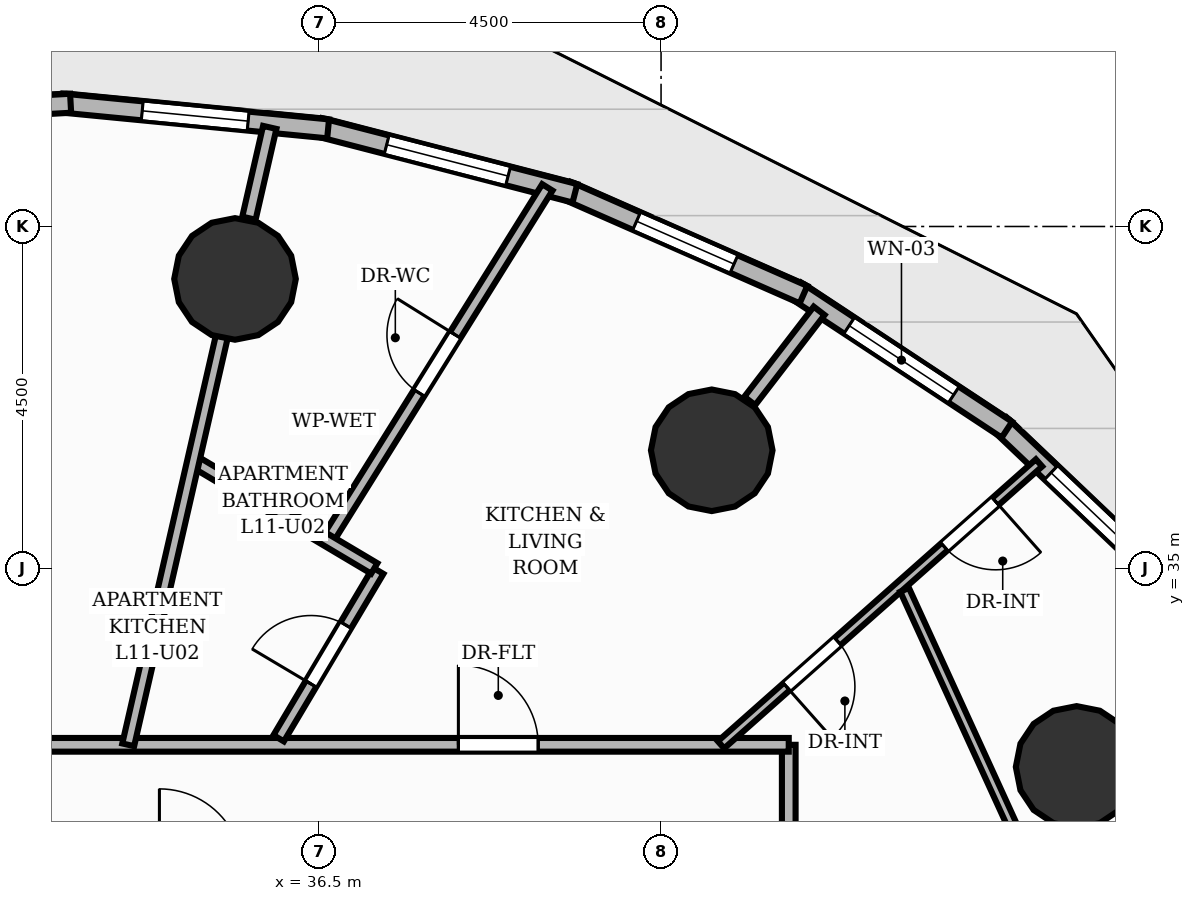
"""IFC4 building model, lengths in metres.
Left out: names, types, materials, properties, quantities, classifications, styles, units other than length and angle.
Written with IfcOpenShell. Run it as: python <this file> out.ifc"""

import sys

from ifc_helpers import new_model, si_unit, direction, frame, frame_2d, origin, origin_2d, place, context, subcontext, project, spatial, rectangle, circle, extrude, element, fill, save


model = new_model("IFC4")
c1 = context("Model", 3, precision=1e-05, world=origin(), true_north=direction((0.0, 1.0)))
c2 = subcontext(c1, "Body", "Model", "MODEL_VIEW")
j1 = project(units=[si_unit("LENGTHUNIT", "METRE"), si_unit("PLANEANGLEUNIT", "RADIAN")], contexts=[c1])
p1 = place(None, origin())
s1 = spatial("IfcSite", under=j1, at=p1, CompositionType="ELEMENT")
p2 = place(p1, origin())
s2 = spatial("IfcBuilding", under=s1, at=p2, CompositionType="ELEMENT")
p3 = place(p2, frame((0.0, 0.0, 40.8)))
s3 = spatial("IfcBuildingStorey", under=s2, at=p3, CompositionType="ELEMENT", Elevation=40.8)
for number, where, z_axis, x_axis in (
    (1, (46.468, 32.389, 0.0), (0.0, 0.0, 1.0), (1.0, 0.0, 0.0)),
    (2, (41.667, 36.555, 0.0), (0.0, 0.0, 1.0), (1.0, 0.0, 0.0)),
    (3, (35.395, 38.81, 0.0), (0.0, 0.0, 1.0), (1.0, 0.0, 0.0)),
):
    element("IfcColumn", number, at=place(p3, frame(where, z_axis=z_axis, x_axis=x_axis)), inside=s3, PredefinedType="COLUMN", context=c2, shape_type="SweptSolid", body=[
        extrude(circle(Radius=0.8, at=origin_2d()), origin(), (0.0, 0.0, 1.0), 3.2),
    ])
p4 = place(p3, frame((45.462, 36.896, 0.0), z_axis=(0.0, 0.0, 1.0), x_axis=(0.724569059836, -0.689202203659, 0.0)))
e4 = element("IfcWall", 4, at=p4, inside=s3, PredefinedType="SOLIDWALL", context=c2, shape_type="SweptSolid", body=[
    extrude(rectangle(XDim=3.244, YDim=0.25, at=frame_2d((1.622, 0.0))), origin(), (0.0, 0.0, 1.0), 2.96),
])
p5 = place(p4, frame((0.922, 0.0, 0.85)))
e5 = element("IfcOpeningElement", 5, at=p5, cuts=e4, PredefinedType="OPENING", context=c2, shape_type="SweptSolid", body=[
    extrude(rectangle(XDim=1.4, YDim=1.55, at=frame_2d((0.7, 0.775))), frame((0.0, 0.135, 0.0), z_axis=(0.0, -1.0, 0.0), x_axis=(1.0, 0.0, 0.0)), (0.0, 0.0, 1.0), 0.27),
])
p6 = place(p3, frame((42.777, 38.656, 0.0), z_axis=(0.0, 0.0, 1.0), x_axis=(0.834663448541, -0.550760317805, 0.0)))
e6 = element("IfcWall", 6, at=p6, inside=s3, PredefinedType="SOLIDWALL", context=c2, shape_type="SweptSolid", body=[
    extrude(rectangle(XDim=3.323, YDim=0.25, at=frame_2d((1.661, 0.0))), origin(), (0.0, 0.0, 1.0), 2.96),
])
p7 = place(p6, frame((0.836, 0.0, 0.85)))
e7 = element("IfcOpeningElement", 7, at=p7, cuts=e6, PredefinedType="OPENING", context=c2, shape_type="SweptSolid", body=[
    extrude(rectangle(XDim=1.65, YDim=1.55, at=frame_2d((0.825, 0.775))), frame((0.0, 0.135, 0.0), z_axis=(0.0, -1.0, 0.0), x_axis=(1.0, 0.0, 0.0)), (0.0, 0.0, 1.0), 0.27),
])
p8 = place(p3, frame((39.763, 39.972, 0.0), z_axis=(0.0, 0.0, 1.0), x_axis=(0.915312914138, -0.402743428515, 0.0)))
e8 = element("IfcWall", 8, at=p8, inside=s3, PredefinedType="SOLIDWALL", context=c2, shape_type="SweptSolid", body=[
    extrude(rectangle(XDim=3.399, YDim=0.25, at=frame_2d((1.699, 0.0))), origin(), (0.0, 0.0, 1.0), 2.96),
])
p9 = place(p8, frame((1.0, 0.0, 0.85)))
e9 = element("IfcOpeningElement", 9, at=p9, cuts=e8, PredefinedType="OPENING", context=c2, shape_type="SweptSolid", body=[
    extrude(rectangle(XDim=1.4, YDim=1.55, at=frame_2d((0.7, 0.775))), frame((0.0, 0.135, 0.0), z_axis=(0.0, -1.0, 0.0), x_axis=(1.0, 0.0, 0.0)), (0.0, 0.0, 1.0), 0.27),
])
p10 = place(p3, frame((36.512, 40.803, 0.0), z_axis=(0.0, 0.0, 1.0), x_axis=(0.968176058434, -0.250270093848, 0.0)))
e10 = element("IfcWall", 10, at=p10, inside=s3, PredefinedType="SOLIDWALL", context=c2, shape_type="SweptSolid", body=[
    extrude(rectangle(XDim=3.465, YDim=0.25, at=frame_2d((1.732, 0.0))), origin(), (0.0, 0.0, 1.0), 2.96),
])
p11 = place(p10, frame((0.907, 0.0, 0.85)))
e11 = element("IfcOpeningElement", 11, at=p11, cuts=e10, PredefinedType="OPENING", context=c2, shape_type="SweptSolid", body=[
    extrude(rectangle(XDim=1.65, YDim=1.55, at=frame_2d((0.825, 0.775))), frame((0.0, 0.135, 0.0), z_axis=(0.0, -1.0, 0.0), x_axis=(1.0, 0.0, 0.0)), (0.0, 0.0, 1.0), 0.27),
])
p12 = place(p3, frame((33.123, 41.124, 0.0), z_axis=(0.0, 0.0, 1.0), x_axis=(0.995323323337, -0.096599596386, 0.0)))
e12 = element("IfcWall", 12, at=p12, inside=s3, PredefinedType="SOLIDWALL", context=c2, shape_type="SweptSolid", body=[
    extrude(rectangle(XDim=3.513, YDim=0.25, at=frame_2d((1.756, 0.0))), origin(), (0.0, 0.0, 1.0), 2.96),
])
p13 = place(p12, frame((1.056, 0.0, 0.85)))
e13 = element("IfcOpeningElement", 13, at=p13, cuts=e12, PredefinedType="OPENING", context=c2, shape_type="SweptSolid", body=[
    extrude(rectangle(XDim=1.4, YDim=1.29, at=frame_2d((0.7, 0.645))), frame((0.0, 0.135, 0.0), z_axis=(0.0, -1.0, 0.0), x_axis=(1.0, 0.0, 0.0)), (0.0, 0.0, 1.0), 0.27),
])
p14 = place(p3, frame((29.699, 40.923, 0.0), z_axis=(0.0, 0.0, 1.0), x_axis=(0.998425121055, 0.056100602904, 0.0)))
e14 = element("IfcWall", 14, at=p14, inside=s3, PredefinedType="SOLIDWALL", context=c2, shape_type="SweptSolid", body=[
    extrude(rectangle(XDim=3.538, YDim=0.25, at=frame_2d((1.769, 0.0))), origin(), (0.0, 0.0, 1.0), 2.96),
])
p15 = place(p14, frame((1.194, 0.0, 0.0)))
e15 = element("IfcOpeningElement", 15, at=p15, cuts=e14, PredefinedType="OPENING", context=c2, shape_type="SweptSolid", body=[
    extrude(rectangle(XDim=1.15, YDim=2.2, at=frame_2d((0.575, 1.1))), frame((0.0, 0.135, 0.0), z_axis=(0.0, -1.0, 0.0), x_axis=(1.0, 0.0, 0.0)), (0.0, 0.0, 1.0), 0.27),
])
p16 = place(p3, frame((42.167, 37.205, 0.0), z_axis=(0.0, 0.0, 1.0), x_axis=(0.609978856004, 0.792417689876, 0.0)))
e16 = element("IfcWall", 16, at=p16, inside=s3, PredefinedType="PARTITIONING", context=c2, shape_type="SweptSolid", body=[
    extrude(rectangle(XDim=1.496, YDim=0.18, at=frame_2d((0.748, 0.0))), origin(), (0.0, 0.0, 1.0), 2.178),
])
p17 = place(p3, frame((35.578, 39.609, 0.0), z_axis=(0.0, 0.0, 1.0), x_axis=(0.223317008343, 0.974745871386, 0.0)))
e17 = element("IfcWall", 17, at=p17, inside=s3, PredefinedType="PARTITIONING", context=c2, shape_type="SweptSolid", body=[
    extrude(rectangle(XDim=1.226, YDim=0.18, at=frame_2d((0.613, 0.0))), origin(), (0.0, 0.0, 1.0), 2.178),
])
p18 = place(p3, frame((42.68, 32.68, 0.0), z_axis=(0.0, 0.0, 1.0), x_axis=(0.0, -1.0, 0.0)))
e18 = element("IfcWall", 18, at=p18, inside=s3, PredefinedType="PARTITIONING", context=c2, shape_type="SweptSolid", body=[
    extrude(rectangle(XDim=10.065, YDim=0.18, at=frame_2d((5.032, 0.0))), origin(), (0.0, 0.0, 1.0), 2.955),
])
p19 = place(p18, frame((7.374, 0.0, 0.0)))
e19 = element("IfcOpeningElement", 19, at=p19, cuts=e18, PredefinedType="OPENING", context=c2, shape_type="SweptSolid", body=[
    extrude(rectangle(XDim=0.9, YDim=2.1, at=frame_2d((0.45, 1.05))), frame((0.0, 0.1, 0.0), z_axis=(0.0, -1.0, 0.0), x_axis=(1.0, 0.0, 0.0)), (0.0, 0.0, 1.0), 0.2),
])
p20 = place(p3, frame((21.32, 32.68, 0.0), z_axis=(0.0, 0.0, 1.0), x_axis=(1.0, 0.0, 0.0)))
e20 = element("IfcWall", 20, at=p20, inside=s3, PredefinedType="PARTITIONING", context=c2, shape_type="SweptSolid", body=[
    extrude(rectangle(XDim=21.36, YDim=0.18, at=frame_2d((10.68, 0.0))), origin(), (0.0, 0.0, 1.0), 2.955),
])
p21 = place(p20, frame((17.013, 0.0, 0.0)))
e21 = element("IfcOpeningElement", 21, at=p21, cuts=e20, PredefinedType="OPENING", context=c2, shape_type="SweptSolid", body=[
    extrude(rectangle(XDim=1.05, YDim=2.15, at=frame_2d((0.525, 1.075))), frame((0.0, 0.1, 0.0), z_axis=(0.0, -1.0, 0.0), x_axis=(1.0, 0.0, 0.0)), (0.0, 0.0, 1.0), 0.2),
])
p22 = place(p20, frame((5.82, 0.0, 0.0)))
e22 = element("IfcOpeningElement", 22, at=p22, cuts=e20, PredefinedType="OPENING", context=c2, shape_type="SweptSolid", body=[
    extrude(rectangle(XDim=1.05, YDim=2.15, at=frame_2d((0.525, 1.075))), frame((0.0, 0.1, 0.0), z_axis=(0.0, -1.0, 0.0), x_axis=(1.0, 0.0, 0.0)), (0.0, 0.0, 1.0), 0.2),
])
p23 = place(p3, frame((36.607, 35.369, 0.0), z_axis=(0.0, 0.0, 1.0), x_axis=(0.529180994646, 0.848508971612, 0.0)))
e23 = element("IfcWall", 23, at=p23, inside=s3, PredefinedType="PLUMBINGWALL", context=c2, shape_type="SweptSolid", body=[
    extrude(rectangle(XDim=5.475, YDim=0.16, at=frame_2d((2.737, 0.0))), origin(), (0.0, 0.0, 1.0), 2.641),
])
p24 = place(p23, frame((2.288, 0.0, 0.0)))
e24 = element("IfcOpeningElement", 24, at=p24, cuts=e23, PredefinedType="OPENING", context=c2, shape_type="SweptSolid", body=[
    extrude(rectangle(XDim=0.9, YDim=2.1, at=frame_2d((0.45, 1.05))), frame((0.0, 0.09, 0.0), z_axis=(0.0, -1.0, 0.0), x_axis=(1.0, 0.0, 0.0)), (0.0, 0.0, 1.0), 0.18),
])
p25 = place(p3, frame((45.973, 36.39, 0.0), z_axis=(0.0, 0.0, 1.0), x_axis=(-0.748208515509, -0.663463651845, 0.0)))
e25 = element("IfcWall", 25, at=p25, inside=s3, PredefinedType="PARTITIONING", context=c2, shape_type="SweptSolid", body=[
    extrude(rectangle(XDim=5.592, YDim=0.125, at=frame_2d((2.796, 0.0))), origin(), (0.0, 0.0, 1.0), 2.955),
])
p26 = place(p25, frame((0.765, 0.0, 0.0)))
e26 = element("IfcOpeningElement", 26, at=p26, cuts=e25, PredefinedType="OPENING", context=c2, shape_type="SweptSolid", body=[
    extrude(rectangle(XDim=0.9, YDim=2.1, at=frame_2d((0.45, 1.05))), frame((0.0, 0.073, 0.0), z_axis=(0.0, -1.0, 0.0), x_axis=(1.0, 0.0, 0.0)), (0.0, 0.0, 1.0), 0.145),
])
p27 = place(p25, frame((3.54, 0.0, 0.0)))
e27 = element("IfcOpeningElement", 27, at=p27, cuts=e25, PredefinedType="OPENING", context=c2, shape_type="SweptSolid", body=[
    extrude(rectangle(XDim=0.9, YDim=2.1, at=frame_2d((0.45, 1.05))), frame((0.0, 0.073, 0.0), z_axis=(0.0, -1.0, 0.0), x_axis=(1.0, 0.0, 0.0)), (0.0, 0.0, 1.0), 0.145),
])
p28 = place(p3, frame((35.969, 32.766, 0.0), z_axis=(0.0, 0.0, 1.0), x_axis=(0.51079395194, 0.859703168926, 0.0)))
e28 = element("IfcWall", 28, at=p28, inside=s3, PredefinedType="PLUMBINGWALL", context=c2, shape_type="SweptSolid", body=[
    extrude(rectangle(XDim=2.564, YDim=0.16, at=frame_2d((1.282, 0.0))), origin(), (0.0, 0.0, 1.0), 2.955),
])
p29 = place(p28, frame((0.832, 0.0, 0.0)))
e29 = element("IfcOpeningElement", 29, at=p29, cuts=e28, PredefinedType="OPENING", context=c2, shape_type="SweptSolid", body=[
    extrude(rectangle(XDim=0.9, YDim=2.1, at=frame_2d((0.45, 1.05))), frame((0.0, 0.09, 0.0), z_axis=(0.0, -1.0, 0.0), x_axis=(1.0, 0.0, 0.0)), (0.0, 0.0, 1.0), 0.18),
])
p30 = place(p3, frame((37.227, 35.001, 0.0), z_axis=(0.0, 0.0, 1.0), x_axis=(-0.859670870998, 0.510848307776, 0.0)))
e30 = element("IfcWall", 30, at=p30, inside=s3, PredefinedType="PLUMBINGWALL", context=c2, shape_type="SweptSolid", body=[
    extrude(rectangle(XDim=2.77, YDim=0.16, at=frame_2d((1.385, 0.0))), origin(), (0.0, 0.0, 1.0), 2.955),
])
p31 = place(p3, frame((33.99, 32.68, 0.0), z_axis=(0.0, 0.0, 1.0), x_axis=(0.223435779217, 0.974718653031, 0.0)))
e31 = element("IfcWall", 31, at=p31, inside=s3, PredefinedType="PLUMBINGWALL", context=c2, shape_type="SweptSolid", body=[
    extrude(rectangle(XDim=5.511, YDim=0.16, at=frame_2d((2.756, 0.0))), origin(), (0.0, 0.0, 1.0), 2.178),
])
p32 = place(p3, frame((47.81, 26.827, 0.0), z_axis=(0.0, 0.0, 1.0), x_axis=(-0.41559351113, 0.909550456823, 0.0)))
e32 = element("IfcWall", 32, at=p32, inside=s3, PredefinedType="PARTITIONING", context=c2, shape_type="SweptSolid", body=[
    extrude(rectangle(XDim=8.677, YDim=0.125, at=frame_2d((4.338, 0.0))), origin(), (0.0, 0.0, 1.0), 2.328),
])
p33 = place(p5, origin())
e33 = element("IfcWindow", 33, at=p33, inside=s3, PartitioningType="SINGLE_PANEL", PredefinedType="WINDOW", context=c2, shape_type="SweptSolid", body=[
    extrude(rectangle(XDim=1.4, YDim=1.55, at=frame_2d((0.7, 0.775))), frame((0.0, 0.03, 0.0), z_axis=(0.0, -1.0, 0.0), x_axis=(1.0, 0.0, 0.0)), (0.0, 0.0, 1.0), 0.06),
])
fill(e5, e33)
p34 = place(p7, origin())
e34 = element("IfcWindow", 34, at=p34, inside=s3, PartitioningType="SINGLE_PANEL", PredefinedType="WINDOW", context=c2, shape_type="SweptSolid", body=[
    extrude(rectangle(XDim=1.65, YDim=1.55, at=frame_2d((0.825, 0.775))), frame((0.0, 0.03, 0.0), z_axis=(0.0, -1.0, 0.0), x_axis=(1.0, 0.0, 0.0)), (0.0, 0.0, 1.0), 0.06),
])
fill(e7, e34)
p35 = place(p9, origin())
e35 = element("IfcWindow", 35, at=p35, inside=s3, PartitioningType="SINGLE_PANEL", PredefinedType="WINDOW", context=c2, shape_type="SweptSolid", body=[
    extrude(rectangle(XDim=1.4, YDim=1.55, at=frame_2d((0.7, 0.775))), frame((0.0, 0.03, 0.0), z_axis=(0.0, -1.0, 0.0), x_axis=(1.0, 0.0, 0.0)), (0.0, 0.0, 1.0), 0.06),
])
fill(e9, e35)
p36 = place(p11, origin())
e36 = element("IfcWindow", 36, at=p36, inside=s3, PartitioningType="SINGLE_PANEL", PredefinedType="WINDOW", context=c2, shape_type="SweptSolid", body=[
    extrude(rectangle(XDim=1.65, YDim=1.55, at=frame_2d((0.825, 0.775))), frame((0.0, 0.03, 0.0), z_axis=(0.0, -1.0, 0.0), x_axis=(1.0, 0.0, 0.0)), (0.0, 0.0, 1.0), 0.06),
])
fill(e11, e36)
p37 = place(p13, origin())
e37 = element("IfcWindow", 37, at=p37, inside=s3, PartitioningType="SINGLE_PANEL", PredefinedType="WINDOW", context=c2, shape_type="SweptSolid", body=[
    extrude(rectangle(XDim=1.4, YDim=1.29, at=frame_2d((0.7, 0.645))), frame((0.0, 0.03, 0.0), z_axis=(0.0, -1.0, 0.0), x_axis=(1.0, 0.0, 0.0)), (0.0, 0.0, 1.0), 0.06),
])
fill(e13, e37)
p38 = place(p21, origin())
e38 = element("IfcDoor", 38, at=p38, inside=s3, OperationType="SINGLE_SWING_LEFT", PredefinedType="DOOR", context=c2, shape_type="SweptSolid", body=[
    extrude(rectangle(XDim=1.05, YDim=2.15, at=frame_2d((0.525, 1.075))), frame((0.0, 0.025, 0.0), z_axis=(0.0, -1.0, 0.0), x_axis=(1.0, 0.0, 0.0)), (0.0, 0.0, 1.0), 0.05),
])
fill(e21, e38)
p39 = place(p24, origin())
e39 = element("IfcDoor", 39, at=p39, inside=s3, OperationType="SINGLE_SWING_RIGHT", PredefinedType="DOOR", context=c2, shape_type="SweptSolid", body=[
    extrude(rectangle(XDim=0.9, YDim=2.1, at=frame_2d((0.45, 1.05))), frame((0.0, 0.025, 0.0), z_axis=(0.0, -1.0, 0.0), x_axis=(1.0, 0.0, 0.0)), (0.0, 0.0, 1.0), 0.05),
])
fill(e24, e39)
p40 = place(p26, origin())
e40 = element("IfcDoor", 40, at=p40, inside=s3, OperationType="SINGLE_SWING_LEFT", PredefinedType="DOOR", context=c2, shape_type="SweptSolid", body=[
    extrude(rectangle(XDim=0.9, YDim=2.1, at=frame_2d((0.45, 1.05))), frame((0.0, 0.025, 0.0), z_axis=(0.0, -1.0, 0.0), x_axis=(1.0, 0.0, 0.0)), (0.0, 0.0, 1.0), 0.05),
])
fill(e26, e40)
p41 = place(p27, origin())
e41 = element("IfcDoor", 41, at=p41, inside=s3, OperationType="SINGLE_SWING_RIGHT", PredefinedType="DOOR", context=c2, shape_type="SweptSolid", body=[
    extrude(rectangle(XDim=0.9, YDim=2.1, at=frame_2d((0.45, 1.05))), frame((0.0, 0.025, 0.0), z_axis=(0.0, -1.0, 0.0), x_axis=(1.0, 0.0, 0.0)), (0.0, 0.0, 1.0), 0.05),
])
fill(e27, e41)
p42 = place(p29, origin())
e42 = element("IfcDoor", 42, at=p42, inside=s3, OperationType="SINGLE_SWING_LEFT", PredefinedType="DOOR", context=c2, shape_type="SweptSolid", body=[
    extrude(rectangle(XDim=0.9, YDim=2.1, at=frame_2d((0.45, 1.05))), frame((0.0, 0.025, 0.0), z_axis=(0.0, -1.0, 0.0), x_axis=(1.0, 0.0, 0.0)), (0.0, 0.0, 1.0), 0.05),
])
fill(e29, e42)
save(model, sys.argv[1])
